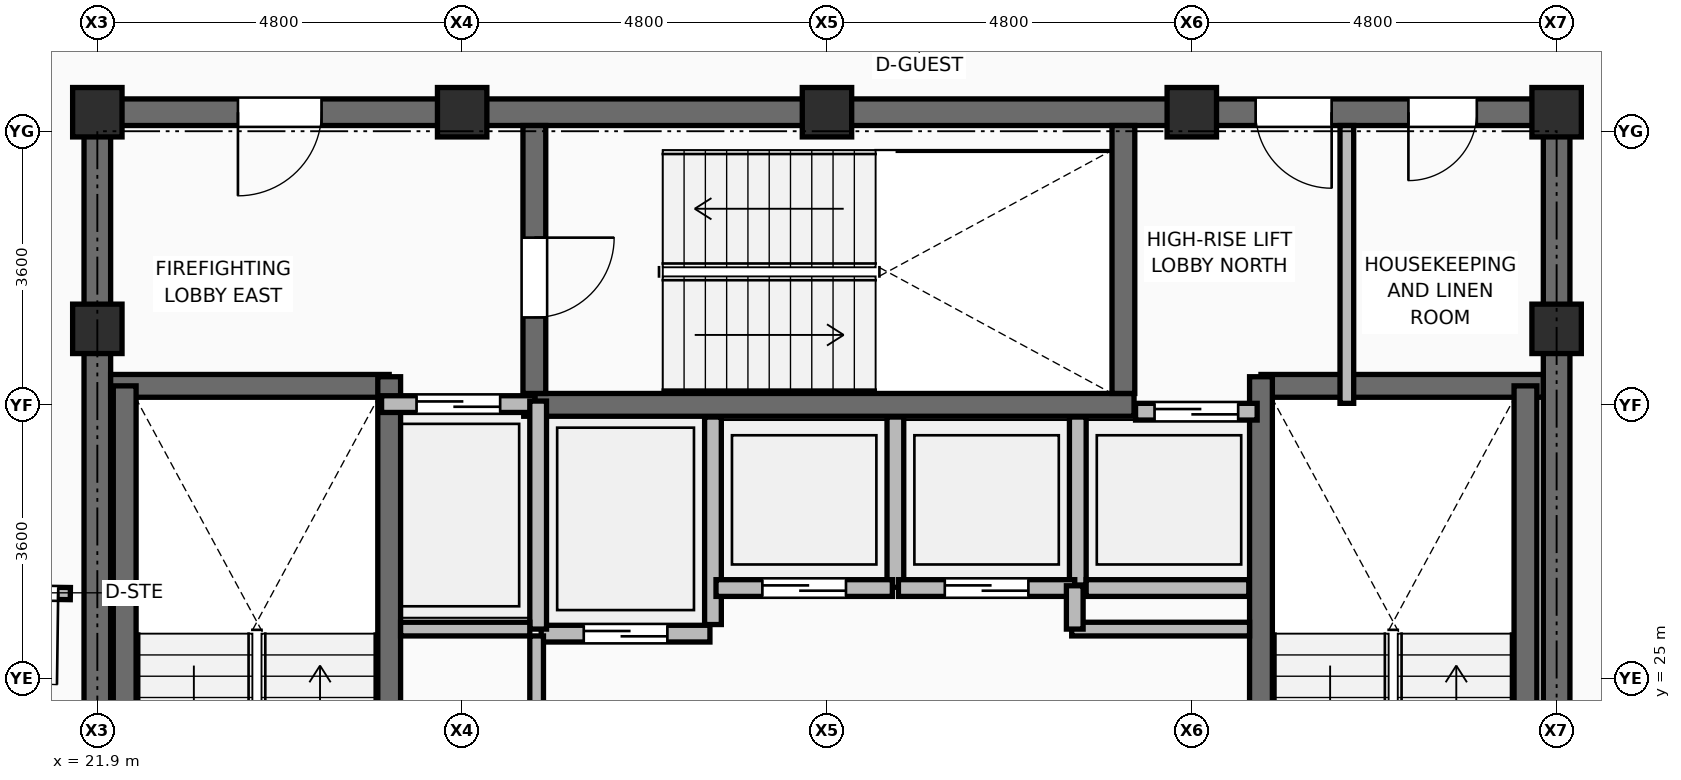
"""IFC4 building model, lengths in metres.
Left out: names, types, materials, properties, quantities, classifications, styles, units other than length and angle.
Written with IfcOpenShell. Run it as: python <this file> out.ifc"""

import sys

from ifc_helpers import new_model, si_unit, direction, frame, frame_2d, origin, origin_2d, place, context, subcontext, project, spatial, rectangle, extrude, element, fill, save


model = new_model("IFC4")
c1 = context("Model", 3, precision=1e-05, world=origin(), true_north=direction((0.0, 1.0)))
c2 = subcontext(c1, "Body", "Model", "MODEL_VIEW")
j1 = project(units=[si_unit("LENGTHUNIT", "METRE"), si_unit("PLANEANGLEUNIT", "RADIAN")], contexts=[c1])
p1 = place(None, origin())
s1 = spatial("IfcSite", under=j1, at=p1, CompositionType="ELEMENT")
p2 = place(p1, origin())
s2 = spatial("IfcBuilding", under=s1, at=p2, CompositionType="ELEMENT")
p3 = place(p2, frame((0.0, 0.0, 263.85)))
s3 = spatial("IfcBuildingStorey", under=s2, at=p3, CompositionType="ELEMENT", Elevation=263.85)
for number, where, z_axis, x_axis in (
    (1, (21.9, 29.6, 0.0), (0.0, 0.0, 1.0), (1.0, 0.0, 0.0)),
    (2, (41.1, 29.6, 0.0), (0.0, 0.0, 1.0), (1.0, 0.0, 0.0)),
    (3, (21.9, 32.45, 0.0), (0.0, 0.0, 1.0), (1.0, 0.0, 0.0)),
    (4, (26.7, 32.45, 0.0), (0.0, 0.0, 1.0), (1.0, 0.0, 0.0)),
    (5, (31.5, 32.45, 0.0), (0.0, 0.0, 1.0), (1.0, 0.0, 0.0)),
    (6, (36.3, 32.45, 0.0), (0.0, 0.0, 1.0), (1.0, 0.0, 0.0)),
    (7, (41.1, 32.45, 0.0), (0.0, 0.0, 1.0), (1.0, 0.0, 0.0)),
):
    element("IfcColumn", number, at=place(p3, frame(where, z_axis=z_axis, x_axis=x_axis)), inside=s3, PredefinedType="COLUMN", context=c2, shape_type="SweptSolid", body=[
        extrude(rectangle(XDim=0.65, YDim=0.65, at=origin_2d()), origin(), (0.0, 0.0, 1.0), 3.75),
    ])
p4 = place(p3, frame((30.0, 25.71, 0.0), z_axis=(0.0, 0.0, 1.0), x_axis=(0.0, 1.0, 0.0)))
e8 = element("IfcWall", 8, at=p4, inside=s3, PredefinedType="PARTITIONING", context=c2, shape_type="SweptSolid", body=[
    extrude(rectangle(XDim=2.73, YDim=0.22, at=frame_2d((1.365, 0.0))), origin(), (0.0, 0.0, 1.0), 3.545),
])
p5 = place(p3, frame((32.4, 26.2, 0.0), z_axis=(0.0, 0.0, 1.0), x_axis=(0.0, 1.0, 0.0)))
e9 = element("IfcWall", 9, at=p5, inside=s3, PredefinedType="PARTITIONING", context=c2, shape_type="SweptSolid", body=[
    extrude(rectangle(XDim=2.24, YDim=0.22, at=frame_2d((1.12, 0.0))), origin(), (0.0, 0.0, 1.0), 3.545),
])
p6 = place(p3, frame((34.8, 26.23, 0.0), z_axis=(0.0, 0.0, 1.0), x_axis=(0.0, 1.0, 0.0)))
e10 = element("IfcWall", 10, at=p6, inside=s3, PredefinedType="PARTITIONING", context=c2, shape_type="SweptSolid", body=[
    extrude(rectangle(XDim=2.21, YDim=0.22, at=frame_2d((1.105, 0.0))), origin(), (0.0, 0.0, 1.0), 3.545),
])
p7 = place(p3, frame((34.91, 26.19, 0.0), z_axis=(0.0, 0.0, 1.0), x_axis=(1.0, 0.0, 0.0)))
e11 = element("IfcWall", 11, at=p7, inside=s3, PredefinedType="PARTITIONING", context=c2, shape_type="SweptSolid", body=[
    extrude(rectangle(XDim=2.14, YDim=0.22, at=frame_2d((1.07, 0.0))), origin(), (0.0, 0.0, 1.0), 3.545),
])
p8 = place(p3, frame((21.725, 32.45, 0.0), z_axis=(0.0, 0.0, 1.0), x_axis=(1.0, 0.0, 0.0)))
e12 = element("IfcWall", 12, at=p8, inside=s3, PredefinedType="SHEAR", context=c2, shape_type="SweptSolid", body=[
    extrude(rectangle(XDim=19.55, YDim=0.35, at=frame_2d((9.775, 0.0))), origin(), (0.0, 0.0, 1.0), 3.57),
])
p9 = place(p8, frame((2.025, 0.0, 0.0)))
e13 = element("IfcOpeningElement", 13, at=p9, cuts=e12, PredefinedType="OPENING", context=c2, shape_type="SweptSolid", body=[
    extrude(rectangle(XDim=1.1, YDim=2.1, at=frame_2d((0.55, 1.05))), frame((0.0, 0.185, 0.0), z_axis=(0.0, -1.0, 0.0), x_axis=(1.0, 0.0, 0.0)), (0.0, 0.0, 1.0), 0.37),
])
p10 = place(p8, frame((15.415, 0.0, 0.0)))
e14 = element("IfcOpeningElement", 14, at=p10, cuts=e12, PredefinedType="OPENING", context=c2, shape_type="SweptSolid", body=[
    extrude(rectangle(XDim=1.0, YDim=2.1, at=frame_2d((0.5, 1.05))), frame((0.0, 0.185, 0.0), z_axis=(0.0, -1.0, 0.0), x_axis=(1.0, 0.0, 0.0)), (0.0, 0.0, 1.0), 0.37),
])
p11 = place(p8, frame((17.425, 0.0, 0.0)))
e15 = element("IfcOpeningElement", 15, at=p11, cuts=e12, PredefinedType="OPENING", context=c2, shape_type="SweptSolid", body=[
    extrude(rectangle(XDim=0.9, YDim=2.1, at=frame_2d((0.45, 1.05))), frame((0.0, 0.185, 0.0), z_axis=(0.0, -1.0, 0.0), x_axis=(1.0, 0.0, 0.0)), (0.0, 0.0, 1.0), 0.37),
])
p12 = place(p3, frame((21.9, 17.975, 0.0), z_axis=(0.0, 0.0, 1.0), x_axis=(0.0, 1.0, 0.0)))
e16 = element("IfcWall", 16, at=p12, inside=s3, PredefinedType="SHEAR", context=c2, shape_type="SweptSolid", body=[
    extrude(rectangle(XDim=14.3, YDim=0.35, at=frame_2d((7.15, 0.0))), origin(), (0.0, 0.0, 1.0), 3.57),
])
p13 = place(p3, frame((41.1, 17.975, 0.0), z_axis=(0.0, 0.0, 1.0), x_axis=(0.0, 1.0, 0.0)))
e17 = element("IfcWall", 17, at=p13, inside=s3, PredefinedType="SHEAR", context=c2, shape_type="SweptSolid", body=[
    extrude(rectangle(XDim=14.3, YDim=0.35, at=frame_2d((7.15, 0.0))), origin(), (0.0, 0.0, 1.0), 3.57),
])
p14 = place(p13, frame((3.485, 0.0, 0.0)))
e18 = element("IfcOpeningElement", 18, at=p14, cuts=e17, PredefinedType="OPENING", context=c2, shape_type="SweptSolid", body=[
    extrude(rectangle(XDim=1.05, YDim=2.1, at=frame_2d((0.525, 1.05))), frame((0.0, 0.185, 0.0), z_axis=(0.0, -1.0, 0.0), x_axis=(1.0, 0.0, 0.0)), (0.0, 0.0, 1.0), 0.37),
])
p15 = place(p3, frame((22.075, 28.85, 0.0), z_axis=(0.0, 0.0, 1.0), x_axis=(1.0, 0.0, 0.0)))
e19 = element("IfcWall", 19, at=p15, inside=s3, PredefinedType="SHEAR", context=c2, shape_type="SweptSolid", body=[
    extrude(rectangle(XDim=3.665, YDim=0.3, at=frame_2d((1.833, 0.0))), origin(), (0.0, 0.0, 1.0), 3.57),
])
p16 = place(p3, frame((25.74, 20.98, 0.0), z_axis=(0.0, 0.0, 1.0), x_axis=(0.0, 1.0, 0.0)))
e20 = element("IfcWall", 20, at=p16, inside=s3, PredefinedType="SHEAR", context=c2, shape_type="SweptSolid", body=[
    extrude(rectangle(XDim=7.99, YDim=0.3, at=frame_2d((3.995, 0.0))), origin(), (0.0, 0.0, 1.0), 3.57),
])
p17 = place(p3, frame((22.26, 21.1, 0.0), z_axis=(0.0, 0.0, 1.0), x_axis=(0.0, 1.0, 0.0)))
e21 = element("IfcWall", 21, at=p17, inside=s3, PredefinedType="SHEAR", context=c2, shape_type="SweptSolid", body=[
    extrude(rectangle(XDim=7.75, YDim=0.3, at=frame_2d((3.875, 0.0))), origin(), (0.0, 0.0, 1.0), 3.57),
])
p18 = place(p3, frame((37.21, 28.85, 0.0), z_axis=(0.0, 0.0, 1.0), x_axis=(1.0, 0.0, 0.0)))
e22 = element("IfcWall", 22, at=p18, inside=s3, PredefinedType="SHEAR", context=c2, shape_type="SweptSolid", body=[
    extrude(rectangle(XDim=3.715, YDim=0.3, at=frame_2d((1.857, 0.0))), origin(), (0.0, 0.0, 1.0), 3.57),
])
p19 = place(p3, frame((37.21, 20.98, 0.0), z_axis=(0.0, 0.0, 1.0), x_axis=(0.0, 1.0, 0.0)))
e23 = element("IfcWall", 23, at=p19, inside=s3, PredefinedType="SHEAR", context=c2, shape_type="SweptSolid", body=[
    extrude(rectangle(XDim=7.99, YDim=0.3, at=frame_2d((3.995, 0.0))), origin(), (0.0, 0.0, 1.0), 3.57),
])
p20 = place(p3, frame((40.69, 22.65, 0.0), z_axis=(0.0, 0.0, 1.0), x_axis=(0.0, 1.0, 0.0)))
e24 = element("IfcWall", 24, at=p20, inside=s3, PredefinedType="SHEAR", context=c2, shape_type="SweptSolid", body=[
    extrude(rectangle(XDim=6.2, YDim=0.3, at=frame_2d((3.1, 0.0))), origin(), (0.0, 0.0, 1.0), 3.57),
])
p21 = place(p3, frame((27.51, 28.6, 0.0), z_axis=(0.0, 0.0, 1.0), x_axis=(1.0, 0.0, 0.0)))
e25 = element("IfcWall", 25, at=p21, inside=s3, PredefinedType="SHEAR", context=c2, shape_type="SweptSolid", body=[
    extrude(rectangle(XDim=8.03, YDim=0.3, at=frame_2d((4.015, 0.0))), origin(), (0.0, 0.0, 1.0), 3.57),
])
p22 = place(p3, frame((27.65, 28.75, 0.0), z_axis=(0.0, 0.0, 1.0), x_axis=(0.0, 1.0, 0.0)))
e26 = element("IfcWall", 26, at=p22, inside=s3, PredefinedType="SHEAR", context=c2, shape_type="SweptSolid", body=[
    extrude(rectangle(XDim=3.525, YDim=0.3, at=frame_2d((1.762, 0.0))), origin(), (0.0, 0.0, 1.0), 3.57),
])
p23 = place(p22, frame((1.0, 0.0, 0.0)))
e27 = element("IfcOpeningElement", 27, at=p23, cuts=e26, PredefinedType="OPENING", context=c2, shape_type="SweptSolid", body=[
    extrude(rectangle(XDim=1.05, YDim=2.1, at=frame_2d((0.525, 1.05))), frame((0.0, 0.16, 0.0), z_axis=(0.0, -1.0, 0.0), x_axis=(1.0, 0.0, 0.0)), (0.0, 0.0, 1.0), 0.32),
])
p24 = place(p3, frame((35.4, 28.75, 0.0), z_axis=(0.0, 0.0, 1.0), x_axis=(0.0, 1.0, 0.0)))
e28 = element("IfcWall", 28, at=p24, inside=s3, PredefinedType="SHEAR", context=c2, shape_type="SweptSolid", body=[
    extrude(rectangle(XDim=3.525, YDim=0.3, at=frame_2d((1.762, 0.0))), origin(), (0.0, 0.0, 1.0), 3.57),
])
p25 = place(p3, frame((25.64, 28.61, 0.0), z_axis=(0.0, 0.0, 1.0), x_axis=(1.0, 0.0, 0.0)))
e29 = element("IfcWall", 29, at=p25, inside=s3, PredefinedType="PARTITIONING", context=c2, shape_type="SweptSolid", body=[
    extrude(rectangle(XDim=2.02, YDim=0.22, at=frame_2d((1.01, 0.0))), origin(), (0.0, 0.0, 1.0), 3.55),
])
p26 = place(p25, frame((0.46, 0.0, 0.0)))
e30 = element("IfcOpeningElement", 30, at=p26, cuts=e29, PredefinedType="OPENING", context=c2, shape_type="SweptSolid", body=[
    extrude(rectangle(XDim=1.1, YDim=2.2, at=frame_2d((0.55, 1.1))), frame((0.0, 0.12, 0.0), z_axis=(0.0, -1.0, 0.0), x_axis=(1.0, 0.0, 0.0)), (0.0, 0.0, 1.0), 0.24),
])
p27 = place(p3, frame((27.74, 25.59, 0.0), z_axis=(0.0, 0.0, 1.0), x_axis=(1.0, 0.0, 0.0)))
e31 = element("IfcWall", 31, at=p27, inside=s3, PredefinedType="PARTITIONING", context=c2, shape_type="SweptSolid", body=[
    extrude(rectangle(XDim=2.22, YDim=0.22, at=frame_2d((1.11, 0.0))), origin(), (0.0, 0.0, 1.0), 3.55),
])
p28 = place(p27, frame((0.56, 0.0, 0.0)))
e32 = element("IfcOpeningElement", 32, at=p28, cuts=e31, PredefinedType="OPENING", context=c2, shape_type="SweptSolid", body=[
    extrude(rectangle(XDim=1.1, YDim=2.2, at=frame_2d((0.55, 1.1))), frame((0.0, 0.12, 0.0), z_axis=(0.0, -1.0, 0.0), x_axis=(1.0, 0.0, 0.0)), (0.0, 0.0, 1.0), 0.24),
])
p29 = place(p3, frame((30.04, 26.19, 0.0), z_axis=(0.0, 0.0, 1.0), x_axis=(1.0, 0.0, 0.0)))
e33 = element("IfcWall", 33, at=p29, inside=s3, PredefinedType="PARTITIONING", context=c2, shape_type="SweptSolid", body=[
    extrude(rectangle(XDim=2.32, YDim=0.22, at=frame_2d((1.16, 0.0))), origin(), (0.0, 0.0, 1.0), 3.55),
])
p30 = place(p29, frame((0.61, 0.0, 0.0)))
e34 = element("IfcOpeningElement", 34, at=p30, cuts=e33, PredefinedType="OPENING", context=c2, shape_type="SweptSolid", body=[
    extrude(rectangle(XDim=1.1, YDim=2.2, at=frame_2d((0.55, 1.1))), frame((0.0, 0.12, 0.0), z_axis=(0.0, -1.0, 0.0), x_axis=(1.0, 0.0, 0.0)), (0.0, 0.0, 1.0), 0.24),
])
p31 = place(p3, frame((32.44, 26.19, 0.0), z_axis=(0.0, 0.0, 1.0), x_axis=(1.0, 0.0, 0.0)))
e35 = element("IfcWall", 35, at=p31, inside=s3, PredefinedType="PARTITIONING", context=c2, shape_type="SweptSolid", body=[
    extrude(rectangle(XDim=2.32, YDim=0.22, at=frame_2d((1.16, 0.0))), origin(), (0.0, 0.0, 1.0), 3.55),
])
p32 = place(p31, frame((0.61, 0.0, 0.0)))
e36 = element("IfcOpeningElement", 36, at=p32, cuts=e35, PredefinedType="OPENING", context=c2, shape_type="SweptSolid", body=[
    extrude(rectangle(XDim=1.1, YDim=2.2, at=frame_2d((0.55, 1.1))), frame((0.0, 0.12, 0.0), z_axis=(0.0, -1.0, 0.0), x_axis=(1.0, 0.0, 0.0)), (0.0, 0.0, 1.0), 0.24),
])
p33 = place(p3, frame((35.56, 28.51, 0.0), z_axis=(0.0, 0.0, 1.0), x_axis=(1.0, 0.0, 0.0)))
e37 = element("IfcWall", 37, at=p33, inside=s3, PredefinedType="PARTITIONING", context=c2, shape_type="SweptSolid", body=[
    extrude(rectangle(XDim=1.6, YDim=0.22, at=frame_2d((0.8, 0.0))), origin(), (0.0, 0.0, 1.0), 3.55),
])
p34 = place(p33, frame((0.25, 0.0, 0.0)))
e38 = element("IfcOpeningElement", 38, at=p34, cuts=e37, PredefinedType="OPENING", context=c2, shape_type="SweptSolid", body=[
    extrude(rectangle(XDim=1.1, YDim=2.2, at=frame_2d((0.55, 1.1))), frame((0.0, 0.12, 0.0), z_axis=(0.0, -1.0, 0.0), x_axis=(1.0, 0.0, 0.0)), (0.0, 0.0, 1.0), 0.24),
])
p35 = place(p3, frame((27.7, 25.65, 0.0), z_axis=(0.0, 0.0, 1.0), x_axis=(0.0, 1.0, 0.0)))
e39 = element("IfcWall", 39, at=p35, inside=s3, PredefinedType="PARTITIONING", context=c2, shape_type="SweptSolid", body=[
    extrude(rectangle(XDim=3.0, YDim=0.22, at=frame_2d((1.5, 0.0))), origin(), (0.0, 0.0, 1.0), 3.55),
])
p36 = place(p3, frame((25.89, 25.65, 0.0), z_axis=(0.0, 0.0, 1.0), x_axis=(1.0, 0.0, 0.0)))
e40 = element("IfcWall", 40, at=p36, inside=s3, PredefinedType="PARTITIONING", context=c2, shape_type="SweptSolid", body=[
    extrude(rectangle(XDim=1.7, YDim=0.18, at=frame_2d((0.85, 0.0))), origin(), (0.0, 0.0, 1.0), 3.55),
])
p37 = place(p3, frame((27.68, 21.19, 0.0), z_axis=(0.0, 0.0, 1.0), x_axis=(0.0, 1.0, 0.0)))
e41 = element("IfcWall", 41, at=p37, inside=s3, PredefinedType="PARTITIONING", context=c2, shape_type="SweptSolid", body=[
    extrude(rectangle(XDim=4.37, YDim=0.18, at=frame_2d((2.185, 0.0))), origin(), (0.0, 0.0, 1.0), 3.55),
])
p38 = place(p37, frame((1.735, 0.0, 0.0)))
e42 = element("IfcOpeningElement", 42, at=p38, cuts=e41, PredefinedType="OPENING", context=c2, shape_type="SweptSolid", body=[
    extrude(rectangle(XDim=0.9, YDim=2.1, at=frame_2d((0.45, 1.05))), frame((0.0, 0.1, 0.0), z_axis=(0.0, -1.0, 0.0), x_axis=(1.0, 0.0, 0.0)), (0.0, 0.0, 1.0), 0.2),
])
p39 = place(p3, frame((34.72, 25.65, 0.0), z_axis=(0.0, 0.0, 1.0), x_axis=(1.0, 0.0, 0.0)))
e43 = element("IfcWall", 43, at=p39, inside=s3, PredefinedType="PARTITIONING", context=c2, shape_type="SweptSolid", body=[
    extrude(rectangle(XDim=2.34, YDim=0.18, at=frame_2d((1.17, 0.0))), origin(), (0.0, 0.0, 1.0), 3.55),
])
p40 = place(p3, frame((34.76, 25.65, 0.0), z_axis=(0.0, 0.0, 1.0), x_axis=(0.0, 1.0, 0.0)))
e44 = element("IfcWall", 44, at=p40, inside=s3, PredefinedType="PARTITIONING", context=c2, shape_type="SweptSolid", body=[
    extrude(rectangle(XDim=0.57, YDim=0.22, at=frame_2d((0.285, 0.0))), origin(), (0.0, 0.0, 1.0), 3.55),
])
p41 = place(p3, frame((38.34, 28.62, 0.0), z_axis=(0.0, 0.0, 1.0), x_axis=(0.0, 1.0, 0.0)))
e45 = element("IfcWall", 45, at=p41, inside=s3, PredefinedType="PARTITIONING", context=c2, shape_type="SweptSolid", body=[
    extrude(rectangle(XDim=3.655, YDim=0.18, at=frame_2d((1.827, 0.0))), origin(), (0.0, 0.0, 1.0), 3.132),
])
p42 = place(p3, frame((21.545, 26.117, 0.0), z_axis=(0.0, 0.0, 1.0), x_axis=(-0.999908513059, 0.0135264745, 0.0)))
e46 = element("IfcWall", 46, at=p42, inside=s3, PredefinedType="PARTITIONING", context=c2, shape_type="SweptSolid", body=[
    extrude(rectangle(XDim=1.859, YDim=0.16, at=frame_2d((0.93, 0.0))), origin(), (0.0, 0.0, 1.0), 2.595),
])
p43 = place(p42, frame((0.16, 0.0, 0.0)))
e47 = element("IfcOpeningElement", 47, at=p43, cuts=e46, PredefinedType="OPENING", context=c2, shape_type="SweptSolid", body=[
    extrude(rectangle(XDim=1.2, YDim=2.1, at=frame_2d((0.6, 1.05))), frame((0.0, 0.09, 0.0), z_axis=(0.0, -1.0, 0.0), x_axis=(1.0, 0.0, 0.0)), (0.0, 0.0, 1.0), 0.18),
])
p44 = place(p23, frame((1.05, 0.0, 0.0), z_axis=(0.0, 0.0, 1.0), x_axis=(-1.0, 0.0, 0.0)))
e48 = element("IfcDoor", 48, at=p44, inside=s3, OperationType="SINGLE_SWING_LEFT", PredefinedType="DOOR", context=c2, shape_type="SweptSolid", body=[
    extrude(rectangle(XDim=1.05, YDim=2.1, at=frame_2d((0.525, 1.05))), frame((0.0, 0.025, 0.0), z_axis=(0.0, -1.0, 0.0), x_axis=(1.0, 0.0, 0.0)), (0.0, 0.0, 1.0), 0.05),
])
fill(e27, e48)
p45 = place(p26, origin())
e49 = element("IfcDoor", 49, at=p45, inside=s3, OperationType="DOUBLE_DOOR_SLIDING", PredefinedType="DOOR", context=c2, shape_type="SweptSolid", body=[
    extrude(rectangle(XDim=1.1, YDim=2.2, at=frame_2d((0.55, 1.1))), frame((0.0, 0.025, 0.0), z_axis=(0.0, -1.0, 0.0), x_axis=(1.0, 0.0, 0.0)), (0.0, 0.0, 1.0), 0.05),
])
fill(e30, e49)
p46 = place(p28, frame((1.1, 0.0, 0.0), z_axis=(0.0, 0.0, 1.0), x_axis=(-1.0, 0.0, 0.0)))
e50 = element("IfcDoor", 50, at=p46, inside=s3, OperationType="DOUBLE_DOOR_SLIDING", PredefinedType="DOOR", context=c2, shape_type="SweptSolid", body=[
    extrude(rectangle(XDim=1.1, YDim=2.2, at=frame_2d((0.55, 1.1))), frame((0.0, 0.025, 0.0), z_axis=(0.0, -1.0, 0.0), x_axis=(1.0, 0.0, 0.0)), (0.0, 0.0, 1.0), 0.05),
])
fill(e32, e50)
p47 = place(p30, frame((1.1, 0.0, 0.0), z_axis=(0.0, 0.0, 1.0), x_axis=(-1.0, 0.0, 0.0)))
e51 = element("IfcDoor", 51, at=p47, inside=s3, OperationType="DOUBLE_DOOR_SLIDING", PredefinedType="DOOR", context=c2, shape_type="SweptSolid", body=[
    extrude(rectangle(XDim=1.1, YDim=2.2, at=frame_2d((0.55, 1.1))), frame((0.0, 0.025, 0.0), z_axis=(0.0, -1.0, 0.0), x_axis=(1.0, 0.0, 0.0)), (0.0, 0.0, 1.0), 0.05),
])
fill(e34, e51)
p48 = place(p32, frame((1.1, 0.0, 0.0), z_axis=(0.0, 0.0, 1.0), x_axis=(-1.0, 0.0, 0.0)))
e52 = element("IfcDoor", 52, at=p48, inside=s3, OperationType="DOUBLE_DOOR_SLIDING", PredefinedType="DOOR", context=c2, shape_type="SweptSolid", body=[
    extrude(rectangle(XDim=1.1, YDim=2.2, at=frame_2d((0.55, 1.1))), frame((0.0, 0.025, 0.0), z_axis=(0.0, -1.0, 0.0), x_axis=(1.0, 0.0, 0.0)), (0.0, 0.0, 1.0), 0.05),
])
fill(e36, e52)
p49 = place(p34, origin())
e53 = element("IfcDoor", 53, at=p49, inside=s3, OperationType="DOUBLE_DOOR_SLIDING", PredefinedType="DOOR", context=c2, shape_type="SweptSolid", body=[
    extrude(rectangle(XDim=1.1, YDim=2.2, at=frame_2d((0.55, 1.1))), frame((0.0, 0.025, 0.0), z_axis=(0.0, -1.0, 0.0), x_axis=(1.0, 0.0, 0.0)), (0.0, 0.0, 1.0), 0.05),
])
fill(e38, e53)
p50 = place(p9, frame((1.1, 0.0, 0.0), z_axis=(0.0, 0.0, 1.0), x_axis=(-1.0, 0.0, 0.0)))
e54 = element("IfcDoor", 54, at=p50, inside=s3, OperationType="SINGLE_SWING_RIGHT", PredefinedType="DOOR", context=c2, shape_type="SweptSolid", body=[
    extrude(rectangle(XDim=1.1, YDim=2.1, at=frame_2d((0.55, 1.05))), frame((0.0, 0.025, 0.0), z_axis=(0.0, -1.0, 0.0), x_axis=(1.0, 0.0, 0.0)), (0.0, 0.0, 1.0), 0.05),
])
fill(e13, e54)
p51 = place(p10, frame((1.0, 0.0, 0.0), z_axis=(0.0, 0.0, 1.0), x_axis=(-1.0, 0.0, 0.0)))
e55 = element("IfcDoor", 55, at=p51, inside=s3, OperationType="SINGLE_SWING_LEFT", PredefinedType="DOOR", context=c2, shape_type="SweptSolid", body=[
    extrude(rectangle(XDim=1.0, YDim=2.1, at=frame_2d((0.5, 1.05))), frame((0.0, 0.025, 0.0), z_axis=(0.0, -1.0, 0.0), x_axis=(1.0, 0.0, 0.0)), (0.0, 0.0, 1.0), 0.05),
])
fill(e14, e55)
p52 = place(p11, frame((0.9, 0.0, 0.0), z_axis=(0.0, 0.0, 1.0), x_axis=(-1.0, 0.0, 0.0)))
e56 = element("IfcDoor", 56, at=p52, inside=s3, OperationType="SINGLE_SWING_RIGHT", PredefinedType="DOOR", context=c2, shape_type="SweptSolid", body=[
    extrude(rectangle(XDim=0.9, YDim=2.1, at=frame_2d((0.45, 1.05))), frame((0.0, 0.025, 0.0), z_axis=(0.0, -1.0, 0.0), x_axis=(1.0, 0.0, 0.0)), (0.0, 0.0, 1.0), 0.05),
])
fill(e15, e56)
p53 = place(p43, origin())
e57 = element("IfcDoor", 57, at=p53, inside=s3, OperationType="SINGLE_SWING_LEFT", PredefinedType="DOOR", context=c2, shape_type="SweptSolid", body=[
    extrude(rectangle(XDim=1.2, YDim=2.1, at=frame_2d((0.6, 1.05))), frame((0.0, 0.025, 0.0), z_axis=(0.0, -1.0, 0.0), x_axis=(1.0, 0.0, 0.0)), (0.0, 0.0, 1.0), 0.05),
])
fill(e47, e57)
save(model, sys.argv[1])
